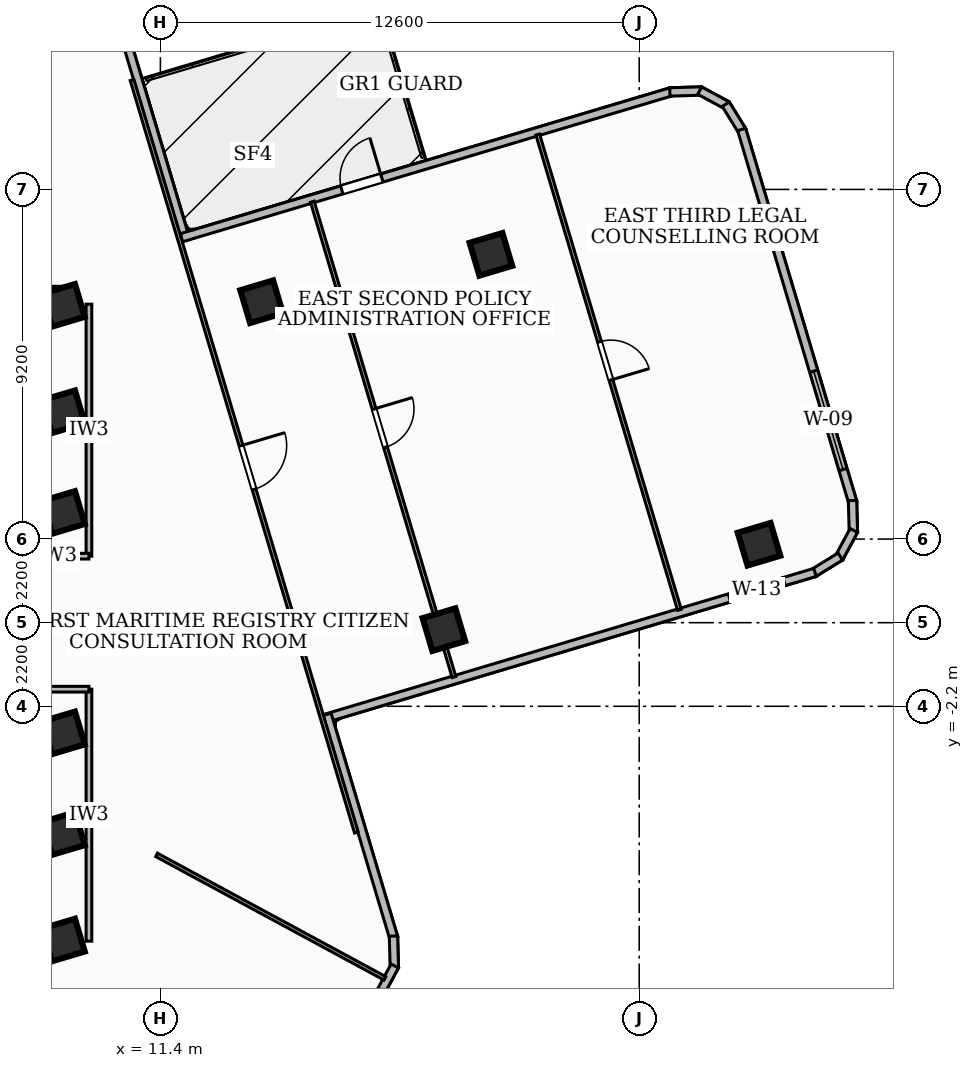
"""IFC4 building model, lengths in metres.
Left out: names, types, materials, properties, quantities, classifications, styles, units other than length and angle.
Written with IfcOpenShell. Run it as: python <this file> out.ifc"""

import sys

from ifc_helpers import new_model, si_unit, direction, frame, frame_2d, origin, origin_2d, place, context, subcontext, project, spatial, rectangle, extrude, element, fill, save


model = new_model("IFC4")
c1 = context("Model", 3, precision=1e-05, world=origin(), true_north=direction((0.0, 1.0)))
c2 = subcontext(c1, "Body", "Model", "MODEL_VIEW")
j1 = project(units=[si_unit("LENGTHUNIT", "METRE"), si_unit("PLANEANGLEUNIT", "RADIAN")], contexts=[c1])
p1 = place(None, origin())
s1 = spatial("IfcSite", under=j1, at=p1, CompositionType="ELEMENT")
p2 = place(p1, origin())
s2 = spatial("IfcBuilding", under=s1, at=p2, CompositionType="ELEMENT")
p3 = place(p2, frame((0.0, 0.0, 141.48)))
s3 = spatial("IfcBuildingStorey", under=s2, at=p3, CompositionType="ELEMENT", Elevation=141.48)
for number, where, z_axis, x_axis in (
    (1, (-8.78, 8.56, 0.0), (0.0, 0.0, 1.0), (1.0, 0.0, 0.0)),
    (2, (8.78, -8.56, 0.0), (0.0, 0.0, 1.0), (-1.0, 0.0, 0.0)),
):
    element("IfcWall", number, at=place(p3, frame(where, z_axis=z_axis, x_axis=x_axis)), inside=s3, PredefinedType="SHEAR", context=c2, shape_type="SweptSolid", body=[
        extrude(rectangle(XDim=17.56, YDim=0.5, at=frame_2d((8.78, 0.0))), origin(), (0.0, 0.0, 1.0), 3.32),
    ])
for number, where, z_axis, x_axis in (
    (3, (8.85, -5.55, 0.0), (0.0, 0.0, 1.0), (0.958, 0.286, 0.0)),
    (4, (8.85, -2.9, 0.0), (0.0, 0.0, 1.0), (0.958, 0.286, 0.0)),
    (5, (8.85, 2.9, 0.0), (0.0, 0.0, 1.0), (0.958, 0.286, 0.0)),
    (6, (8.85, 5.55, 0.0), (0.0, 0.0, 1.0), (0.958, 0.286, 0.0)),
    (7, (8.85, -8.35, 0.0), (0.0, 0.0, 1.0), (0.958, 0.286, 0.0)),
    (8, (8.85, 8.35, 0.0), (0.0, 0.0, 1.0), (0.958, 0.286, 0.0)),
    (9, (18.86, -0.183, 0.0), (0.0, 0.0, 1.0), (0.958, 0.286, 0.0)),
    (10, (14.064, 8.445, 0.0), (0.0, 0.0, 1.0), (0.958, 0.286, 0.0)),
    (11, (27.153, 2.064, 0.0), (0.0, 0.0, 1.0), (0.958, 0.286, 0.0)),
    (12, (20.098, 9.692, 0.0), (0.0, 0.0, 1.0), (0.958, 0.286, 0.0)),
):
    element("IfcColumn", number, at=place(p3, frame(where, z_axis=z_axis, x_axis=x_axis)), inside=s3, PredefinedType="COLUMN", context=c2, shape_type="SweptSolid", body=[
        extrude(rectangle(XDim=0.9, YDim=0.9, at=origin_2d()), origin(), (0.0, 0.0, 1.0), 3.6),
    ])
p4 = place(p3, frame((10.136, 16.546, 0.0), z_axis=(0.0, 0.0, 1.0), x_axis=(0.285607207592, -0.958346765514, 0.0)))
e13 = element("IfcWall", 13, at=p4, inside=s3, PredefinedType="SOLIDWALL", context=c2, shape_type="SweptSolid", body=[
    extrude(rectangle(XDim=6.757, YDim=0.22, at=frame_2d((3.379, 0.0))), origin(), (0.0, 0.0, 1.0), 2.7),
])
p5 = place(p3, frame((11.957, 10.129, 0.0), z_axis=(0.0, 0.0, 1.0), x_axis=(0.958343962332, 0.285616613419, 0.0)))
e14 = element("IfcWall", 14, at=p5, inside=s3, PredefinedType="SOLIDWALL", context=c2, shape_type="SweptSolid", body=[
    extrude(rectangle(XDim=13.458, YDim=0.22, at=frame_2d((6.729, 0.0))), origin(), (0.0, 0.0, 1.0), 2.7),
])
p6 = place(p5, frame((4.4, 0.0, 0.0)))
e15 = element("IfcOpeningElement", 15, at=p6, cuts=e14, PredefinedType="OPENING", context=c2, shape_type="SweptSolid", body=[
    extrude(rectangle(XDim=1.1, YDim=2.1, at=frame_2d((0.55, 1.05))), frame((0.0, 0.12, 0.0), z_axis=(0.0, -1.0, 0.0), x_axis=(1.0, 0.0, 0.0)), (0.0, 0.0, 1.0), 0.24),
])
p7 = place(p3, frame((24.806, 13.965, 0.0), z_axis=(0.0, 0.0, 1.0), x_axis=(0.999587773882, 0.028710317069, 0.0)))
e16 = element("IfcWall", 16, at=p7, inside=s3, PredefinedType="SOLIDWALL", context=c2, shape_type="SweptSolid", body=[
    extrude(rectangle(XDim=0.833, YDim=0.22, at=frame_2d((0.417, 0.0))), origin(), (0.0, 0.0, 1.0), 3.32),
])
p8 = place(p3, frame((25.592, 14.0, 0.0), z_axis=(0.0, 0.0, 1.0), x_axis=(0.879608832869, -0.47569769932, 0.0)))
e17 = element("IfcWall", 17, at=p8, inside=s3, PredefinedType="SOLIDWALL", context=c2, shape_type="SweptSolid", body=[
    extrude(rectangle(XDim=0.82, YDim=0.22, at=frame_2d((0.41, 0.0))), origin(), (0.0, 0.0, 1.0), 3.32),
])
p9 = place(p3, frame((26.278, 13.643, 0.0), z_axis=(0.0, 0.0, 1.0), x_axis=(0.524195456684, -0.851597982144, 0.0)))
e18 = element("IfcWall", 18, at=p9, inside=s3, PredefinedType="SOLIDWALL", context=c2, shape_type="SweptSolid", body=[
    extrude(rectangle(XDim=0.834, YDim=0.22, at=frame_2d((0.417, 0.0))), origin(), (0.0, 0.0, 1.0), 3.32),
])
p10 = place(p3, frame((26.695, 12.978, 0.0), z_axis=(0.0, 0.0, 1.0), x_axis=(0.285720239165, -0.958313072504, 0.0)))
e19 = element("IfcWall", 19, at=p10, inside=s3, PredefinedType="SOLIDWALL", context=c2, shape_type="SweptSolid", body=[
    extrude(rectangle(XDim=10.241, YDim=0.22, at=frame_2d((5.121, 0.0))), origin(), (0.0, 0.0, 1.0), 3.32),
])
p11 = place(p10, frame((6.638, 0.0, 0.85)))
e20 = element("IfcOpeningElement", 20, at=p11, cuts=e19, PredefinedType="OPENING", context=c2, shape_type="SweptSolid", body=[
    extrude(rectangle(XDim=2.7, YDim=1.65, at=frame_2d((1.35, 0.825))), frame((0.0, 0.12, 0.0), z_axis=(0.0, -1.0, 0.0), x_axis=(1.0, 0.0, 0.0)), (0.0, 0.0, 1.0), 0.24),
])
p12 = place(p3, frame((29.613, 3.213, 0.0), z_axis=(0.0, 0.0, 1.0), x_axis=(0.027507151941, -0.999621606705, 0.0)))
e21 = element("IfcWall", 21, at=p12, inside=s3, PredefinedType="SOLIDWALL", context=c2, shape_type="SweptSolid", body=[
    extrude(rectangle(XDim=0.834, YDim=0.22, at=frame_2d((0.417, 0.0))), origin(), (0.0, 0.0, 1.0), 3.32),
])
p13 = place(p3, frame((29.647, 2.426, 0.0), z_axis=(0.0, 0.0, 1.0), x_axis=(-0.474775054815, -0.880107179453, 0.0)))
e22 = element("IfcWall", 22, at=p13, inside=s3, PredefinedType="SOLIDWALL", context=c2, shape_type="SweptSolid", body=[
    extrude(rectangle(XDim=0.819, YDim=0.22, at=frame_2d((0.41, 0.0))), origin(), (0.0, 0.0, 1.0), 3.32),
])
p14 = place(p3, frame((29.291, 1.74, 0.0), z_axis=(0.0, 0.0, 1.0), x_axis=(-0.851597982144, -0.524195456684, 0.0)))
e23 = element("IfcWall", 23, at=p14, inside=s3, PredefinedType="SOLIDWALL", context=c2, shape_type="SweptSolid", body=[
    extrude(rectangle(XDim=0.834, YDim=0.22, at=frame_2d((0.417, 0.0))), origin(), (0.0, 0.0, 1.0), 3.32),
])
p15 = place(p3, frame((28.626, 1.323, 0.0), z_axis=(0.0, 0.0, 1.0), x_axis=(-0.958343962332, -0.285616613419, 0.0)))
e24 = element("IfcWall", 24, at=p15, inside=s3, PredefinedType="SOLIDWALL", context=c2, shape_type="SweptSolid", body=[
    extrude(rectangle(XDim=13.458, YDim=0.22, at=frame_2d((6.729, 0.0))), origin(), (0.0, 0.0, 1.0), 3.32),
])
p16 = place(p15, frame((0.85, 0.0, 0.85)))
e25 = element("IfcOpeningElement", 25, at=p16, cuts=e24, PredefinedType="OPENING", context=c2, shape_type="SweptSolid", body=[
    extrude(rectangle(XDim=1.5, YDim=1.8, at=frame_2d((0.75, 0.9))), frame((0.0, 0.12, 0.0), z_axis=(0.0, -1.0, 0.0), x_axis=(1.0, 0.0, 0.0)), (0.0, 0.0, 1.0), 0.24),
])
p17 = place(p3, frame((15.787, -2.412, 0.0), z_axis=(0.0, 0.0, 1.0), x_axis=(0.285712854037, -0.958315274342, 0.0)))
e26 = element("IfcWall", 26, at=p17, inside=s3, PredefinedType="SOLIDWALL", context=c2, shape_type="SweptSolid", body=[
    extrude(rectangle(XDim=6.139, YDim=0.22, at=frame_2d((3.069, 0.0))), origin(), (0.0, 0.0, 1.0), 3.32),
])
p18 = place(p3, frame((17.533, -8.246, 0.0), z_axis=(0.0, 0.0, 1.0), x_axis=(0.028676726094, -0.999588738122, 0.0)))
e27 = element("IfcWall", 27, at=p18, inside=s3, PredefinedType="SOLIDWALL", context=c2, shape_type="SweptSolid", body=[
    extrude(rectangle(XDim=0.834, YDim=0.22, at=frame_2d((0.417, 0.0))), origin(), (0.0, 0.0, 1.0), 3.32),
])
p19 = place(p3, frame((17.568, -9.033, 0.0), z_axis=(0.0, 0.0, 1.0), x_axis=(-0.475928115507, -0.879484183411, 0.0)))
e28 = element("IfcWall", 28, at=p19, inside=s3, PredefinedType="SOLIDWALL", context=c2, shape_type="SweptSolid", body=[
    extrude(rectangle(XDim=0.82, YDim=0.22, at=frame_2d((0.41, 0.0))), origin(), (0.0, 0.0, 1.0), 3.32),
])
p20 = place(p3, frame((9.52, 1.75, 0.0), z_axis=(0.0, 0.0, 1.0), x_axis=(0.0, 1.0, 0.0)))
e29 = element("IfcWall", 29, at=p20, inside=s3, PredefinedType="PARTITIONING", context=c2, shape_type="SweptSolid", body=[
    extrude(rectangle(XDim=6.63, YDim=0.15, at=frame_2d((3.315, 0.0))), origin(), (0.0, 0.0, 1.0), 2.55),
])
p21 = place(p3, frame((7.85, 1.75, 0.0), z_axis=(0.0, 0.0, 1.0), x_axis=(1.0, 0.0, 0.0)))
e30 = element("IfcWall", 30, at=p21, inside=s3, PredefinedType="PARTITIONING", context=c2, shape_type="SweptSolid", body=[
    extrude(rectangle(XDim=1.67, YDim=0.15, at=frame_2d((0.835, 0.0))), origin(), (0.0, 0.0, 1.0), 2.55),
])
p22 = place(p3, frame((9.52, -8.38, 0.0), z_axis=(0.0, 0.0, 1.0), x_axis=(0.0, 1.0, 0.0)))
e31 = element("IfcWall", 31, at=p22, inside=s3, PredefinedType="PARTITIONING", context=c2, shape_type="SweptSolid", body=[
    extrude(rectangle(XDim=6.63, YDim=0.15, at=frame_2d((3.315, 0.0))), origin(), (0.0, 0.0, 1.0), 2.55),
])
p23 = place(p3, frame((7.85, -1.75, 0.0), z_axis=(0.0, 0.0, 1.0), x_axis=(1.0, 0.0, 0.0)))
e32 = element("IfcWall", 32, at=p23, inside=s3, PredefinedType="PARTITIONING", context=c2, shape_type="SweptSolid", body=[
    extrude(rectangle(XDim=1.67, YDim=0.15, at=frame_2d((0.835, 0.0))), origin(), (0.0, 0.0, 1.0), 2.55),
])
p24 = place(p3, frame((5.612, 10.38, 0.0), z_axis=(0.0, 0.0, 1.0), x_axis=(0.475666815962, 0.879625534073, 0.0)))
e33 = element("IfcWall", 33, at=p24, inside=s3, PredefinedType="PARTITIONING", context=c2, shape_type="SweptSolid", body=[
    extrude(rectangle(XDim=7.875, YDim=0.1, at=frame_2d((3.938, 0.0))), origin(), (0.0, 0.0, 1.0), 2.55),
])
p25 = place(p3, frame((11.3, -6.11, 0.0), z_axis=(0.0, 0.0, 1.0), x_axis=(0.879653556483, -0.475614991948, 0.0)))
e34 = element("IfcWall", 34, at=p25, inside=s3, PredefinedType="PARTITIONING", context=c2, shape_type="SweptSolid", body=[
    extrude(rectangle(XDim=6.829, YDim=0.1, at=frame_2d((3.414, 0.0))), origin(), (0.0, 0.0, 1.0), 3.32),
])
p26 = place(p3, frame((10.655, 14.279, 0.0), z_axis=(0.0, 0.0, 1.0), x_axis=(0.285665949025, -0.958329257389, 0.0)))
e35 = element("IfcWall", 35, at=p26, inside=s3, PredefinedType="PARTITIONING", context=c2, shape_type="SweptSolid", body=[
    extrude(rectangle(XDim=20.66, YDim=0.1, at=frame_2d((10.33, 0.0))), origin(), (0.0, 0.0, 1.0), 2.55),
])
p27 = place(p26, frame((10.04, 0.0, 0.0)))
e36 = element("IfcOpeningElement", 36, at=p27, cuts=e35, PredefinedType="OPENING", context=c2, shape_type="SweptSolid", body=[
    extrude(rectangle(XDim=1.2, YDim=2.1, at=frame_2d((0.6, 1.05))), frame((0.0, 0.06, 0.0), z_axis=(0.0, -1.0, 0.0), x_axis=(1.0, 0.0, 0.0)), (0.0, 0.0, 1.0), 0.12),
])
p28 = place(p3, frame((15.398, 11.076, 0.0), z_axis=(0.0, 0.0, 1.0), x_axis=(0.285679130118, -0.958325328171, 0.0)))
e37 = element("IfcWall", 37, at=p28, inside=s3, PredefinedType="PARTITIONING", context=c2, shape_type="SweptSolid", body=[
    extrude(rectangle(XDim=13.05, YDim=0.1, at=frame_2d((6.525, 0.0))), origin(), (0.0, 0.0, 1.0), 2.55),
])
p29 = place(p28, frame((5.69, 0.0, 0.0)))
e38 = element("IfcOpeningElement", 38, at=p29, cuts=e37, PredefinedType="OPENING", context=c2, shape_type="SweptSolid", body=[
    extrude(rectangle(XDim=1.05, YDim=2.08, at=frame_2d((0.525, 1.04))), frame((0.0, 0.06, 0.0), z_axis=(0.0, -1.0, 0.0), x_axis=(1.0, 0.0, 0.0)), (0.0, 0.0, 1.0), 0.12),
])
p30 = place(p3, frame((21.33, 12.844, 0.0), z_axis=(0.0, 0.0, 1.0), x_axis=(0.285674008308, -0.958326854981, 0.0)))
e39 = element("IfcWall", 39, at=p30, inside=s3, PredefinedType="PARTITIONING", context=c2, shape_type="SweptSolid", body=[
    extrude(rectangle(XDim=13.05, YDim=0.1, at=frame_2d((6.525, 0.0))), origin(), (0.0, 0.0, 1.0), 2.55),
])
p31 = place(p30, frame((5.69, 0.0, 0.0)))
e40 = element("IfcOpeningElement", 40, at=p31, cuts=e39, PredefinedType="OPENING", context=c2, shape_type="SweptSolid", body=[
    extrude(rectangle(XDim=1.05, YDim=2.08, at=frame_2d((0.525, 1.04))), frame((0.0, 0.06, 0.0), z_axis=(0.0, -1.0, 0.0), x_axis=(1.0, 0.0, 0.0)), (0.0, 0.0, 1.0), 0.12),
])
p32 = place(p6, origin())
e41 = element("IfcDoor", 41, at=p32, inside=s3, OperationType="SINGLE_SWING_RIGHT", PredefinedType="DOOR", context=c2, shape_type="SweptSolid", body=[
    extrude(rectangle(XDim=1.1, YDim=2.1, at=frame_2d((0.55, 1.05))), frame((0.0, 0.025, 0.0), z_axis=(0.0, -1.0, 0.0), x_axis=(1.0, 0.0, 0.0)), (0.0, 0.0, 1.0), 0.05),
])
fill(e15, e41)
p33 = place(p11, origin())
e42 = element("IfcWindow", 42, at=p33, inside=s3, PartitioningType="SINGLE_PANEL", PredefinedType="WINDOW", context=c2, shape_type="SweptSolid", body=[
    extrude(rectangle(XDim=2.7, YDim=1.65, at=frame_2d((1.35, 0.825))), frame((0.0, 0.03, 0.0), z_axis=(0.0, -1.0, 0.0), x_axis=(1.0, 0.0, 0.0)), (0.0, 0.0, 1.0), 0.06),
])
fill(e20, e42)
p34 = place(p16, origin())
e43 = element("IfcWindow", 43, at=p34, inside=s3, PartitioningType="SINGLE_PANEL", PredefinedType="WINDOW", context=c2, shape_type="SweptSolid", body=[
    extrude(rectangle(XDim=1.5, YDim=1.8, at=frame_2d((0.75, 0.9))), frame((0.0, 0.03, 0.0), z_axis=(0.0, -1.0, 0.0), x_axis=(1.0, 0.0, 0.0)), (0.0, 0.0, 1.0), 0.06),
])
fill(e25, e43)
p35 = place(p27, origin())
e44 = element("IfcDoor", 44, at=p35, inside=s3, OperationType="SINGLE_SWING_LEFT", PredefinedType="DOOR", context=c2, shape_type="SweptSolid", body=[
    extrude(rectangle(XDim=1.2, YDim=2.1, at=frame_2d((0.6, 1.05))), frame((0.0, 0.025, 0.0), z_axis=(0.0, -1.0, 0.0), x_axis=(1.0, 0.0, 0.0)), (0.0, 0.0, 1.0), 0.05),
])
fill(e36, e44)
p36 = place(p29, origin())
e45 = element("IfcDoor", 45, at=p36, inside=s3, OperationType="SINGLE_SWING_LEFT", PredefinedType="DOOR", context=c2, shape_type="SweptSolid", body=[
    extrude(rectangle(XDim=1.05, YDim=2.08, at=frame_2d((0.525, 1.04))), frame((0.0, 0.025, 0.0), z_axis=(0.0, -1.0, 0.0), x_axis=(1.0, 0.0, 0.0)), (0.0, 0.0, 1.0), 0.05),
])
fill(e38, e45)
p37 = place(p31, origin())
e46 = element("IfcDoor", 46, at=p37, inside=s3, OperationType="SINGLE_SWING_RIGHT", PredefinedType="DOOR", context=c2, shape_type="SweptSolid", body=[
    extrude(rectangle(XDim=1.05, YDim=2.08, at=frame_2d((0.525, 1.04))), frame((0.0, 0.025, 0.0), z_axis=(0.0, -1.0, 0.0), x_axis=(1.0, 0.0, 0.0)), (0.0, 0.0, 1.0), 0.05),
])
fill(e40, e46)
save(model, sys.argv[1])
